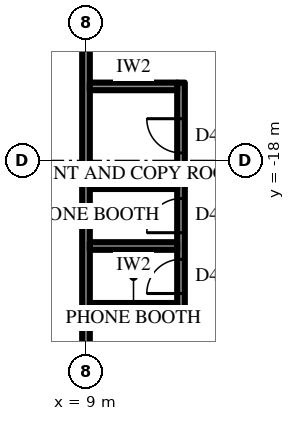
"""IFC4 building model, lengths in metres.
Left out: names, types, materials, properties, quantities, classifications, styles, units other than length and angle.
Written with IfcOpenShell. Run it as: python <this file> out.ifc"""

import sys

from ifc_helpers import new_model, si_unit, direction, frame, frame_2d, origin, place, context, subcontext, project, spatial, rectangle, extrude, element, fill, save


model = new_model("IFC4")
c1 = context("Model", 3, precision=1e-05, world=origin(), true_north=direction((0.0, 1.0)))
c2 = subcontext(c1, "Body", "Model", "MODEL_VIEW")
j1 = project(units=[si_unit("LENGTHUNIT", "METRE"), si_unit("PLANEANGLEUNIT", "RADIAN")], contexts=[c1])
p1 = place(None, origin())
s1 = spatial("IfcSite", under=j1, at=p1, CompositionType="ELEMENT")
p2 = place(p1, origin())
s2 = spatial("IfcBuilding", under=s1, at=p2, CompositionType="ELEMENT")
p3 = place(p2, frame((0.0, 0.0, 165.7)))
s3 = spatial("IfcBuildingStorey", under=s2, at=p3, CompositionType="ELEMENT", Elevation=165.7)
p4 = place(p3, frame((9.0, -12.3, 0.0), z_axis=(0.0, 0.0, 1.0), x_axis=(0.0, -1.0, 0.0)))
e1 = element("IfcWall", 1, at=p4, inside=s3, PredefinedType="PARTITIONING", context=c2, shape_type="SweptSolid", body=[
    extrude(rectangle(XDim=19.0, YDim=0.2, at=frame_2d((9.5, 0.0))), origin(), (0.0, 0.0, 1.0), 4.0),
])
p5 = place(p4, frame((1.4, 0.0, 0.0)))
e2 = element("IfcOpeningElement", 2, at=p5, cuts=e1, PredefinedType="OPENING", context=c2, shape_type="SweptSolid", body=[
    extrude(rectangle(XDim=1.0, YDim=2.2, at=frame_2d((0.5, 1.1))), frame((0.0, 0.11, 0.0), z_axis=(0.0, -1.0, 0.0), x_axis=(1.0, 0.0, 0.0)), (0.0, 0.0, 1.0), 0.22),
])
p6 = place(p3, frame((11.5, -15.95, 0.0), z_axis=(0.0, 0.0, 1.0), x_axis=(0.0, -1.0, 0.0)))
e3 = element("IfcWall", 3, at=p6, inside=s3, PredefinedType="PARTITIONING", context=c2, shape_type="SweptSolid", body=[
    extrude(rectangle(XDim=6.0, YDim=0.2, at=frame_2d((3.0, 0.0))), origin(), (0.0, 0.0, 1.0), 4.0),
])
p7 = place(p6, frame((0.95, 0.0, 0.0)))
e4 = element("IfcOpeningElement", 4, at=p7, cuts=e3, PredefinedType="OPENING", context=c2, shape_type="SweptSolid", body=[
    extrude(rectangle(XDim=0.9, YDim=2.2, at=frame_2d((0.45, 1.1))), frame((0.0, 0.11, 0.0), z_axis=(0.0, -1.0, 0.0), x_axis=(1.0, 0.0, 0.0)), (0.0, 0.0, 1.0), 0.22),
])
p8 = place(p6, frame((3.05, 0.0, 0.0)))
e5 = element("IfcOpeningElement", 5, at=p8, cuts=e3, PredefinedType="OPENING", context=c2, shape_type="SweptSolid", body=[
    extrude(rectangle(XDim=0.9, YDim=2.2, at=frame_2d((0.45, 1.1))), frame((0.0, 0.11, 0.0), z_axis=(0.0, -1.0, 0.0), x_axis=(1.0, 0.0, 0.0)), (0.0, 0.0, 1.0), 0.22),
])
p9 = place(p6, frame((4.65, 0.0, 0.0)))
e6 = element("IfcOpeningElement", 6, at=p9, cuts=e3, PredefinedType="OPENING", context=c2, shape_type="SweptSolid", body=[
    extrude(rectangle(XDim=0.9, YDim=2.2, at=frame_2d((0.45, 1.1))), frame((0.0, 0.11, 0.0), z_axis=(0.0, -1.0, 0.0), x_axis=(1.0, 0.0, 0.0)), (0.0, 0.0, 1.0), 0.22),
])
for number, where, z_axis, x_axis in (
    (7, (9.1, -16.05, 0.0), (0.0, 0.0, 1.0), (1.0, 0.0, 0.0)),
    (8, (9.1, -18.65, 0.0), (0.0, 0.0, 1.0), (1.0, 0.0, 0.0)),
    (9, (9.1, -20.25, 0.0), (0.0, 0.0, 1.0), (1.0, 0.0, 0.0)),
    (10, (9.1, -21.85, 0.0), (0.0, 0.0, 1.0), (1.0, 0.0, 0.0)),
):
    element("IfcWall", number, at=place(p3, frame(where, z_axis=z_axis, x_axis=x_axis)), inside=s3, PredefinedType="PARTITIONING", context=c2, shape_type="SweptSolid", body=[
        extrude(rectangle(XDim=2.3, YDim=0.2, at=frame_2d((1.15, 0.0))), origin(), (0.0, 0.0, 1.0), 4.0),
    ])
p10 = place(p7, frame((0.9, 0.0, 0.0), z_axis=(0.0, 0.0, 1.0), x_axis=(-1.0, 0.0, 0.0)))
e11 = element("IfcDoor", 11, at=p10, inside=s3, OperationType="SINGLE_SWING_LEFT", PredefinedType="DOOR", context=c2, shape_type="SweptSolid", body=[
    extrude(rectangle(XDim=0.9, YDim=2.2, at=frame_2d((0.45, 1.1))), frame((0.0, 0.025, 0.0), z_axis=(0.0, -1.0, 0.0), x_axis=(1.0, 0.0, 0.0)), (0.0, 0.0, 1.0), 0.05),
])
fill(e4, e11)
p11 = place(p8, frame((0.9, 0.0, 0.0), z_axis=(0.0, 0.0, 1.0), x_axis=(-1.0, 0.0, 0.0)))
e12 = element("IfcDoor", 12, at=p11, inside=s3, OperationType="SINGLE_SWING_RIGHT", PredefinedType="DOOR", context=c2, shape_type="SweptSolid", body=[
    extrude(rectangle(XDim=0.9, YDim=2.2, at=frame_2d((0.45, 1.1))), frame((0.0, 0.025, 0.0), z_axis=(0.0, -1.0, 0.0), x_axis=(1.0, 0.0, 0.0)), (0.0, 0.0, 1.0), 0.05),
])
fill(e5, e12)
p12 = place(p9, frame((0.9, 0.0, 0.0), z_axis=(0.0, 0.0, 1.0), x_axis=(-1.0, 0.0, 0.0)))
e13 = element("IfcDoor", 13, at=p12, inside=s3, OperationType="SINGLE_SWING_RIGHT", PredefinedType="DOOR", context=c2, shape_type="SweptSolid", body=[
    extrude(rectangle(XDim=0.9, YDim=2.2, at=frame_2d((0.45, 1.1))), frame((0.0, 0.025, 0.0), z_axis=(0.0, -1.0, 0.0), x_axis=(1.0, 0.0, 0.0)), (0.0, 0.0, 1.0), 0.05),
])
fill(e6, e13)
save(model, sys.argv[1])
